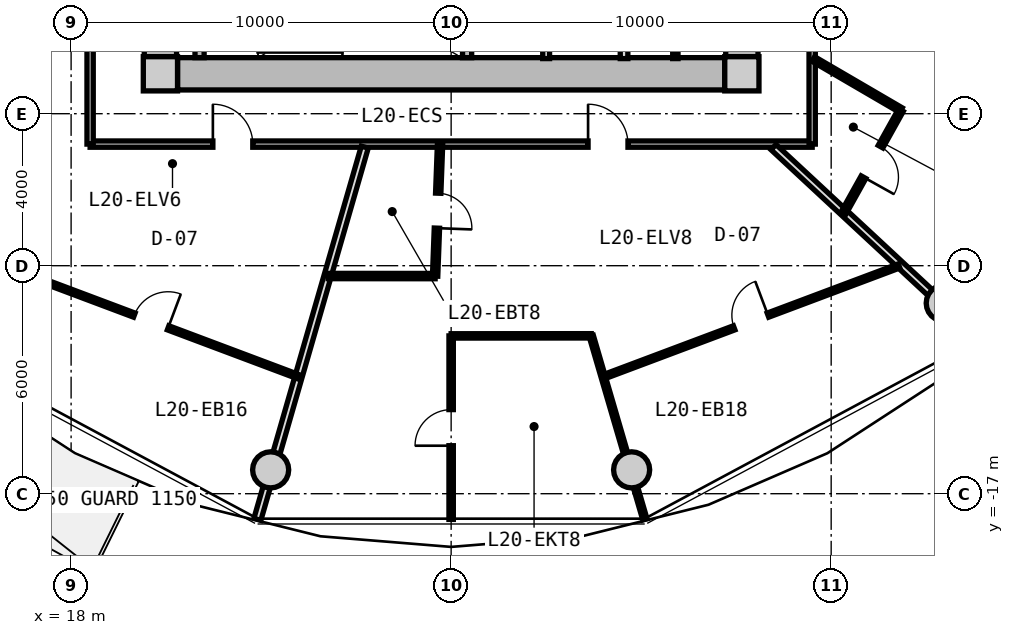
"""IFC4 building model, lengths in metres.
Left out: names, types, materials, properties, quantities, classifications, styles, units other than length and angle.
Written with IfcOpenShell. Run it as: python <this file> out.ifc"""

import sys

from ifc_helpers import new_model, si_unit, direction, frame, frame_2d, origin, origin_2d, place, context, subcontext, project, spatial, rectangle, circle, extrude, source, transform, mapped, element, fill, save


model = new_model("IFC4")
c1 = context("Model", 3, precision=1e-05, world=origin(), true_north=direction((0.0, 1.0)))
c2 = subcontext(c1, "Body", "Model", "MODEL_VIEW")
j1 = project(units=[si_unit("LENGTHUNIT", "METRE"), si_unit("PLANEANGLEUNIT", "RADIAN")], contexts=[c1])
p1 = place(None, origin())
s1 = spatial("IfcSite", under=j1, at=p1, CompositionType="ELEMENT")
p2 = place(p1, origin())
s2 = spatial("IfcBuilding", under=s1, at=p2, CompositionType="ELEMENT")
p3 = place(p2, frame((0.0, 0.0, 67.35)))
s3 = spatial("IfcBuildingStorey", under=s2, at=p3, CompositionType="ELEMENT", Elevation=67.35)
m1 = source(origin(), c2, "Body", "SweptSolid", [
    extrude(rectangle(XDim=0.9, YDim=0.9, at=origin_2d()), origin(), (0.0, 0.0, 1.0), 3.05),
])
for number, where, z_axis, x_axis in (
    (1, (20.35, -5.95, 0.0), (0.0, 0.0, 1.0), (1.0, 0.0, 0.0)),
    (2, (35.65, -5.95, 0.0), (0.0, 0.0, 1.0), (1.0, 0.0, 0.0)),
):
    element("IfcColumn", number, at=place(p3, frame(where, z_axis=z_axis, x_axis=x_axis)), inside=s3, PredefinedType="COLUMN", context=c2, shape_type="MappedRepresentation", body=[
        mapped(m1, transform((0.0, 0.0, 0.0), x_axis=(1.0, 0.0, 0.0), y_axis=(0.0, 1.0, 0.0), z_axis=(0.0, 0.0, 1.0), scale=1.0)),
    ])
m2 = source(origin(), c2, "Body", "SweptSolid", [
    extrude(rectangle(XDim=14.4, YDim=0.85, at=frame_2d((7.2, 0.0))), origin(), (0.0, 0.0, 1.0), 2.79),
])
p4 = place(p3, frame((35.2, -5.95, 0.0), z_axis=(0.0, 0.0, 1.0), x_axis=(-1.0, 0.0, 0.0)))
e3 = element("IfcWall", 3, at=p4, inside=s3, PredefinedType="SHEAR", context=c2, shape_type="MappedRepresentation", body=[
    mapped(m2, transform((0.0, 0.0, 0.0), x_axis=(1.0, 0.0, 0.0), y_axis=(0.0, 1.0, 0.0), z_axis=(0.0, 0.0, 1.0), scale=1.0)),
])
m3 = source(origin(), c2, "Body", "SweptSolid", [
    extrude(rectangle(XDim=11.0, YDim=0.85, at=frame_2d((5.5, 0.0))), origin(), (0.0, 0.0, 1.0), 2.79),
])
p5 = place(p3, frame((20.35, -5.5, 0.0), z_axis=(0.0, 0.0, 1.0), x_axis=(0.0, 1.0, 0.0)))
e4 = element("IfcWall", 4, at=p5, inside=s3, PredefinedType="SHEAR", context=c2, shape_type="MappedRepresentation", body=[
    mapped(m3, transform((0.0, 0.0, 0.0), x_axis=(1.0, 0.0, 0.0), y_axis=(0.0, 1.0, 0.0), z_axis=(0.0, 0.0, 1.0), scale=1.0)),
])
p6 = place(p5, frame((3.8, 0.0, 0.0)))
e5 = element("IfcOpeningElement", 5, at=p6, cuts=e4, PredefinedType="OPENING", context=c2, shape_type="SweptSolid", body=[
    extrude(rectangle(XDim=1.2, YDim=2.15, at=frame_2d((0.6, 1.075))), frame((0.0, 0.435, 0.0), z_axis=(0.0, -1.0, 0.0), x_axis=(1.0, 0.0, 0.0)), (0.0, 0.0, 1.0), 0.87),
])
p7 = place(p3, frame((35.65, 5.5, 0.0), z_axis=(0.0, 0.0, 1.0), x_axis=(0.0, -1.0, 0.0)))
e6 = element("IfcWall", 6, at=p7, inside=s3, PredefinedType="SHEAR", context=c2, shape_type="MappedRepresentation", body=[
    mapped(m3, transform((0.0, 0.0, 0.0), x_axis=(1.0, 0.0, 0.0), y_axis=(0.0, 1.0, 0.0), z_axis=(0.0, 0.0, 1.0), scale=1.0)),
])
p8 = place(p7, frame((5.65, 0.0, 0.0)))
e7 = element("IfcOpeningElement", 7, at=p8, cuts=e6, PredefinedType="OPENING", context=c2, shape_type="SweptSolid", body=[
    extrude(rectangle(XDim=1.2, YDim=2.15, at=frame_2d((0.6, 1.075))), frame((0.0, 0.435, 0.0), z_axis=(0.0, -1.0, 0.0), x_axis=(1.0, 0.0, 0.0)), (0.0, 0.0, 1.0), 0.87),
])
m4 = source(origin(), c2, "Body", "SweptSolid", [
    extrude(circle(Radius=0.475, at=origin_2d()), origin(), (0.0, 0.0, 1.0), 3.05),
])
for number, where, z_axis, x_axis in (
    (8, (23.251, -16.373, 0.0), (0.0, 0.0, 1.0), (1.0, 0.0, 0.0)),
    (9, (32.749, -16.373, 0.0), (0.0, 0.0, 1.0), (1.0, 0.0, 0.0)),
    (10, (40.975, -11.985, 0.0), (0.0, 0.0, 1.0), (1.0, 0.0, 0.0)),
):
    element("IfcColumn", number, at=place(p3, frame(where, z_axis=z_axis, x_axis=x_axis)), inside=s3, PredefinedType="COLUMN", context=c2, shape_type="MappedRepresentation", body=[
        mapped(m4, transform((0.0, 0.0, 0.0), x_axis=(1.0, 0.0, 0.0), y_axis=(0.0, 1.0, 0.0), z_axis=(0.0, 0.0, 1.0), scale=1.0)),
    ])
m5 = source(origin(), c2, "Body", "SweptSolid", [
    extrude(rectangle(XDim=3.075, YDim=0.24, at=frame_2d((1.538, 0.0))), origin(), (0.0, 0.0, 1.0), 2.79),
])
for number, where, z_axis, x_axis in (
    (11, (21.38, -5.525, 0.0), (0.0, 0.0, 1.0), (0.0, 1.0, 0.0)),
    (12, (28.42, -5.525, 0.0), (0.0, 0.0, 1.0), (0.0, 1.0, 0.0)),
):
    element("IfcWall", number, at=place(p3, frame(where, z_axis=z_axis, x_axis=x_axis)), inside=s3, PredefinedType="PARTITIONING", context=c2, shape_type="MappedRepresentation", body=[
        mapped(m5, transform((0.0, 0.0, 0.0), x_axis=(1.0, 0.0, 0.0), y_axis=(0.0, 1.0, 0.0), z_axis=(0.0, 0.0, 1.0), scale=1.0)),
    ])
m6 = source(origin(), c2, "Body", "SweptSolid", [
    extrude(rectangle(XDim=3.8, YDim=0.2, at=frame_2d((1.9, 0.0))), origin(), (0.0, 0.0, 1.0), 2.775),
])
p9 = place(p3, frame((32.55, -5.55, 0.0), z_axis=(0.0, 0.0, 1.0), x_axis=(0.0, 1.0, 0.0)))
e13 = element("IfcWall", 13, at=p9, inside=s3, PredefinedType="PARTITIONING", context=c2, shape_type="MappedRepresentation", body=[
    mapped(m6, transform((0.0, 0.0, 0.0), x_axis=(1.0, 0.0, 0.0), y_axis=(0.0, 1.0, 0.0), z_axis=(0.0, 0.0, 1.0), scale=1.0)),
])
m7 = source(origin(), c2, "Body", "SweptSolid", [
    extrude(rectangle(XDim=3.22, YDim=0.18, at=frame_2d((1.61, 0.0))), origin(), (0.0, 0.0, 1.0), 2.775),
])
p10 = place(p3, frame((30.5, -5.55, 0.0), z_axis=(0.0, 0.0, 1.0), x_axis=(0.0, 1.0, 0.0)))
e14 = element("IfcWall", 14, at=p10, inside=s3, PredefinedType="PARTITIONING", context=c2, shape_type="MappedRepresentation", body=[
    mapped(m7, transform((0.0, 0.0, 0.0), x_axis=(1.0, 0.0, 0.0), y_axis=(0.0, 1.0, 0.0), z_axis=(0.0, 0.0, 1.0), scale=1.0)),
])
m8 = source(origin(), c2, "Body", "SweptSolid", [
    extrude(rectangle(XDim=3.8, YDim=0.14, at=frame_2d((1.9, 0.0))), origin(), (0.0, 0.0, 1.0), 2.775),
])
p11 = place(p3, frame((33.9, -5.55, 0.0), z_axis=(0.0, 0.0, 1.0), x_axis=(0.0, 1.0, 0.0)))
e15 = element("IfcWall", 15, at=p11, inside=s3, PredefinedType="PARTITIONING", context=c2, shape_type="MappedRepresentation", body=[
    mapped(m8, transform((0.0, 0.0, 0.0), x_axis=(1.0, 0.0, 0.0), y_axis=(0.0, 1.0, 0.0), z_axis=(0.0, 0.0, 1.0), scale=1.0)),
])
m9 = source(origin(), c2, "Body", "SweptSolid", [
    extrude(rectangle(XDim=19.0, YDim=0.165, at=frame_2d((9.5, 0.0))), origin(), (0.0, 0.0, 1.0), 2.775),
])
p12 = place(p3, frame((37.5, -7.8, 0.0), z_axis=(0.0, 0.0, 1.0), x_axis=(-1.0, 0.0, 0.0)))
e16 = element("IfcWall", 16, at=p12, inside=s3, PredefinedType="PARTITIONING", context=c2, shape_type="MappedRepresentation", body=[
    mapped(m9, transform((0.0, 0.0, 0.0), x_axis=(1.0, 0.0, 0.0), y_axis=(0.0, 1.0, 0.0), z_axis=(0.0, 0.0, 1.0), scale=1.0)),
])
p13 = place(p12, frame((14.72, 0.0, 0.0)))
e17 = element("IfcOpeningElement", 17, at=p13, cuts=e16, PredefinedType="OPENING", context=c2, shape_type="SweptSolid", body=[
    extrude(rectangle(XDim=1.05, YDim=2.15, at=frame_2d((0.525, 1.075))), frame((0.0, 0.093, 0.0), z_axis=(0.0, -1.0, 0.0), x_axis=(1.0, 0.0, 0.0)), (0.0, 0.0, 1.0), 0.185),
])
p14 = place(p12, frame((4.847, 0.0, 0.0)))
e18 = element("IfcOpeningElement", 18, at=p14, cuts=e16, PredefinedType="OPENING", context=c2, shape_type="SweptSolid", body=[
    extrude(rectangle(XDim=1.05, YDim=2.15, at=frame_2d((0.525, 1.075))), frame((0.0, 0.093, 0.0), z_axis=(0.0, -1.0, 0.0), x_axis=(1.0, 0.0, 0.0)), (0.0, 0.0, 1.0), 0.185),
])
m10 = source(origin(), c2, "Body", "SweptSolid", [
    extrude(rectangle(XDim=15.6, YDim=0.165, at=frame_2d((7.8, 0.0))), origin(), (0.0, 0.0, 1.0), 2.775),
])
p15 = place(p3, frame((18.5, -7.8, 0.0), z_axis=(0.0, 0.0, 1.0), x_axis=(0.0, 1.0, 0.0)))
e19 = element("IfcWall", 19, at=p15, inside=s3, PredefinedType="PARTITIONING", context=c2, shape_type="MappedRepresentation", body=[
    mapped(m10, transform((0.0, 0.0, 0.0), x_axis=(1.0, 0.0, 0.0), y_axis=(0.0, 1.0, 0.0), z_axis=(0.0, 0.0, 1.0), scale=1.0)),
])
p16 = place(p15, frame((14.215, 0.0, 0.0)))
e20 = element("IfcOpeningElement", 20, at=p16, cuts=e19, PredefinedType="OPENING", context=c2, shape_type="SweptSolid", body=[
    extrude(rectangle(XDim=0.92, YDim=2.1, at=frame_2d((0.46, 1.05))), frame((0.0, 0.093, 0.0), z_axis=(0.0, -1.0, 0.0), x_axis=(1.0, 0.0, 0.0)), (0.0, 0.0, 1.0), 0.185),
])
p17 = place(p15, frame((11.609, 0.0, 0.0)))
e21 = element("IfcOpeningElement", 21, at=p17, cuts=e19, PredefinedType="OPENING", context=c2, shape_type="SweptSolid", body=[
    extrude(rectangle(XDim=0.92, YDim=2.1, at=frame_2d((0.46, 1.05))), frame((0.0, 0.093, 0.0), z_axis=(0.0, -1.0, 0.0), x_axis=(1.0, 0.0, 0.0)), (0.0, 0.0, 1.0), 0.185),
])
p18 = place(p15, frame((7.175, 0.0, 0.0)))
e22 = element("IfcOpeningElement", 22, at=p18, cuts=e19, PredefinedType="OPENING", context=c2, shape_type="SweptSolid", body=[
    extrude(rectangle(XDim=1.25, YDim=2.2, at=frame_2d((0.625, 1.1))), frame((0.0, 0.093, 0.0), z_axis=(0.0, -1.0, 0.0), x_axis=(1.0, 0.0, 0.0)), (0.0, 0.0, 1.0), 0.185),
])
p19 = place(p3, frame((37.5, 7.8, 0.0), z_axis=(0.0, 0.0, 1.0), x_axis=(0.0, -1.0, 0.0)))
e23 = element("IfcWall", 23, at=p19, inside=s3, PredefinedType="PARTITIONING", context=c2, shape_type="MappedRepresentation", body=[
    mapped(m10, transform((0.0, 0.0, 0.0), x_axis=(1.0, 0.0, 0.0), y_axis=(0.0, 1.0, 0.0), z_axis=(0.0, 0.0, 1.0), scale=1.0)),
])
p20 = place(p19, frame((8.835, 0.0, 0.0)))
e24 = element("IfcOpeningElement", 24, at=p20, cuts=e23, PredefinedType="OPENING", context=c2, shape_type="SweptSolid", body=[
    extrude(rectangle(XDim=1.05, YDim=2.15, at=frame_2d((0.525, 1.075))), frame((0.0, 0.093, 0.0), z_axis=(0.0, -1.0, 0.0), x_axis=(1.0, 0.0, 0.0)), (0.0, 0.0, 1.0), 0.185),
])
m11 = source(origin(), c2, "Body", "SweptSolid", [
    extrude(rectangle(XDim=10.196, YDim=0.19, at=frame_2d((5.098, 0.0))), origin(), (0.0, 0.0, 1.0), 2.225),
])
p21 = place(p3, frame((25.727, -7.88, 0.0), z_axis=(0.0, 0.0, 1.0), x_axis=(-0.277136420347, -0.960830580549, 0.0)))
e25 = element("IfcWall", 25, at=p21, inside=s3, PredefinedType="PARTITIONING", context=c2, shape_type="MappedRepresentation", body=[
    mapped(m11, transform((0.0, 0.0, 0.0), x_axis=(1.0, 0.0, 0.0), y_axis=(0.0, 1.0, 0.0), z_axis=(0.0, 0.0, 1.0), scale=1.0)),
])
m12 = source(origin(), c2, "Body", "SweptSolid", [
    extrude(rectangle(XDim=8.32, YDim=0.115, at=frame_2d((4.16, 0.0))), origin(), (0.0, 0.0, 1.0), 2.775),
])
p22 = place(p3, frame((16.214, -11.006, 0.0), z_axis=(0.0, 0.0, 1.0), x_axis=(0.936180763098, -0.351518959382, 0.0)))
e26 = element("IfcWall", 26, at=p22, inside=s3, PredefinedType="PARTITIONING", context=c2, shape_type="MappedRepresentation", body=[
    mapped(m12, transform((0.0, 0.0, 0.0), x_axis=(1.0, 0.0, 0.0), y_axis=(0.0, 1.0, 0.0), z_axis=(0.0, 0.0, 1.0), scale=1.0)),
])
p23 = place(p22, frame((3.685, 0.0, 0.0)))
e27 = element("IfcOpeningElement", 27, at=p23, cuts=e26, PredefinedType="OPENING", context=c2, shape_type="SweptSolid", body=[
    extrude(rectangle(XDim=0.95, YDim=2.1, at=frame_2d((0.475, 1.05))), frame((0.0, 0.067, 0.0), z_axis=(0.0, -1.0, 0.0), x_axis=(1.0, 0.0, 0.0)), (0.0, 0.0, 1.0), 0.135),
])
m13 = source(origin(), c2, "Body", "SweptSolid", [
    extrude(rectangle(XDim=2.834, YDim=0.14, at=frame_2d((1.417, 0.0))), origin(), (0.0, 0.0, 1.0), 2.775),
])
p24 = place(p3, frame((18.47, -4.732, 0.0), z_axis=(0.0, 0.0, 1.0), x_axis=(-0.895681174462, -0.444696788513, 0.0)))
e28 = element("IfcWall", 28, at=p24, inside=s3, PredefinedType="PARTITIONING", context=c2, shape_type="MappedRepresentation", body=[
    mapped(m13, transform((0.0, 0.0, 0.0), x_axis=(1.0, 0.0, 0.0), y_axis=(0.0, 1.0, 0.0), z_axis=(0.0, 0.0, 1.0), scale=1.0)),
])
m14 = source(origin(), c2, "Body", "SweptSolid", [
    extrude(rectangle(XDim=7.435, YDim=0.19, at=frame_2d((3.717, 0.0))), origin(), (0.0, 0.0, 1.0), 2.225),
])
p25 = place(p3, frame((36.483, -7.88, 0.0), z_axis=(0.0, 0.0, 1.0), x_axis=(0.732651956848, -0.680603489652, 0.0)))
e29 = element("IfcWall", 29, at=p25, inside=s3, PredefinedType="PARTITIONING", context=c2, shape_type="MappedRepresentation", body=[
    mapped(m14, transform((0.0, 0.0, 0.0), x_axis=(1.0, 0.0, 0.0), y_axis=(0.0, 1.0, 0.0), z_axis=(0.0, 0.0, 1.0), scale=1.0)),
])
p26 = place(p3, frame((31.997, -13.93, 0.0), z_axis=(0.0, 0.0, 1.0), x_axis=(0.936180763098, 0.351518959382, 0.0)))
e30 = element("IfcWall", 30, at=p26, inside=s3, PredefinedType="PARTITIONING", context=c2, shape_type="MappedRepresentation", body=[
    mapped(m12, transform((0.0, 0.0, 0.0), x_axis=(1.0, 0.0, 0.0), y_axis=(0.0, 1.0, 0.0), z_axis=(0.0, 0.0, 1.0), scale=1.0)),
])
p27 = place(p26, frame((3.685, 0.0, 0.0)))
e31 = element("IfcOpeningElement", 31, at=p27, cuts=e30, PredefinedType="OPENING", context=c2, shape_type="SweptSolid", body=[
    extrude(rectangle(XDim=0.95, YDim=2.1, at=frame_2d((0.475, 1.05))), frame((0.0, 0.067, 0.0), z_axis=(0.0, -1.0, 0.0), x_axis=(1.0, 0.0, 0.0)), (0.0, 0.0, 1.0), 0.135),
])
m15 = source(origin(), c2, "Body", "SweptSolid", [
    extrude(rectangle(XDim=5.031, YDim=0.115, at=frame_2d((2.515, 0.0))), origin(), (0.0, 0.0, 1.0), 2.225),
])
p28 = place(p3, frame((31.687, -12.848, 0.0), z_axis=(0.0, 0.0, 1.0), x_axis=(0.280657788738, -0.959807900374, 0.0)))
e32 = element("IfcWall", 32, at=p28, inside=s3, PredefinedType="PARTITIONING", context=c2, shape_type="MappedRepresentation", body=[
    mapped(m15, transform((0.0, 0.0, 0.0), x_axis=(1.0, 0.0, 0.0), y_axis=(0.0, 1.0, 0.0), z_axis=(0.0, 0.0, 1.0), scale=1.0)),
])
m16 = source(origin(), c2, "Body", "SweptSolid", [
    extrude(rectangle(XDim=3.446, YDim=0.14, at=frame_2d((1.723, 0.0))), origin(), (0.0, 0.0, 1.0), 2.775),
])
p29 = place(p3, frame((27.707, -7.83, 0.0), z_axis=(0.0, 0.0, 1.0), x_axis=(-0.037409983043, -0.999300001585, 0.0)))
e33 = element("IfcWall", 33, at=p29, inside=s3, PredefinedType="PARTITIONING", context=c2, shape_type="MappedRepresentation", body=[
    mapped(m16, transform((0.0, 0.0, 0.0), x_axis=(1.0, 0.0, 0.0), y_axis=(0.0, 1.0, 0.0), z_axis=(0.0, 0.0, 1.0), scale=1.0)),
])
p30 = place(p29, frame((1.263, 0.0, 0.0)))
e34 = element("IfcOpeningElement", 34, at=p30, cuts=e33, PredefinedType="OPENING", context=c2, shape_type="SweptSolid", body=[
    extrude(rectangle(XDim=0.92, YDim=2.1, at=frame_2d((0.46, 1.05))), frame((0.0, 0.08, 0.0), z_axis=(0.0, -1.0, 0.0), x_axis=(1.0, 0.0, 0.0)), (0.0, 0.0, 1.0), 0.16),
])
m17 = source(origin(), c2, "Body", "SweptSolid", [
    extrude(rectangle(XDim=2.813, YDim=0.14, at=frame_2d((1.406, 0.0))), origin(), (0.0, 0.0, 1.0), 2.775),
])
p31 = place(p3, frame((27.578, -11.273, 0.0), z_axis=(0.0, 0.0, 1.0), x_axis=(-0.99999981542, 0.000607586035, 0.0)))
e35 = element("IfcWall", 35, at=p31, inside=s3, PredefinedType="PARTITIONING", context=c2, shape_type="MappedRepresentation", body=[
    mapped(m17, transform((0.0, 0.0, 0.0), x_axis=(1.0, 0.0, 0.0), y_axis=(0.0, 1.0, 0.0), z_axis=(0.0, 0.0, 1.0), scale=1.0)),
])
m18 = source(origin(), c2, "Body", "SweptSolid", [
    extrude(rectangle(XDim=4.829, YDim=0.115, at=frame_2d((2.415, 0.0))), origin(), (0.0, 0.0, 1.0), 2.775),
])
p32 = place(p3, frame((28.0, -12.848, 0.0), z_axis=(0.0, 0.0, 1.0), x_axis=(0.0, -1.0, 0.0)))
e36 = element("IfcWall", 36, at=p32, inside=s3, PredefinedType="PARTITIONING", context=c2, shape_type="MappedRepresentation", body=[
    mapped(m18, transform((0.0, 0.0, 0.0), x_axis=(1.0, 0.0, 0.0), y_axis=(0.0, 1.0, 0.0), z_axis=(0.0, 0.0, 1.0), scale=1.0)),
])
p33 = place(p32, frame((1.939, 0.0, 0.0)))
e37 = element("IfcOpeningElement", 37, at=p33, cuts=e36, PredefinedType="OPENING", context=c2, shape_type="SweptSolid", body=[
    extrude(rectangle(XDim=0.95, YDim=2.1, at=frame_2d((0.475, 1.05))), frame((0.0, 0.067, 0.0), z_axis=(0.0, -1.0, 0.0), x_axis=(1.0, 0.0, 0.0)), (0.0, 0.0, 1.0), 0.135),
])
m19 = source(origin(), c2, "Body", "SweptSolid", [
    extrude(rectangle(XDim=3.686, YDim=0.115, at=frame_2d((1.843, 0.0))), origin(), (0.0, 0.0, 1.0), 2.775),
])
p34 = place(p3, frame((28.0, -12.848, 0.0), z_axis=(0.0, 0.0, 1.0), x_axis=(0.999999780653, 0.000662339237, 0.0)))
e38 = element("IfcWall", 38, at=p34, inside=s3, PredefinedType="PARTITIONING", context=c2, shape_type="MappedRepresentation", body=[
    mapped(m19, transform((0.0, 0.0, 0.0), x_axis=(1.0, 0.0, 0.0), y_axis=(0.0, 1.0, 0.0), z_axis=(0.0, 0.0, 1.0), scale=1.0)),
])
m20 = source(origin(), c2, "Body", "SweptSolid", [
    extrude(rectangle(XDim=2.669, YDim=0.14, at=frame_2d((1.335, 0.0))), origin(), (0.0, 0.0, 1.0), 2.775),
])
p35 = place(p3, frame((37.53, -5.561, 0.0), z_axis=(0.0, 0.0, 1.0), x_axis=(0.86369928178, -0.50400749067, 0.0)))
e39 = element("IfcWall", 39, at=p35, inside=s3, PredefinedType="PARTITIONING", context=c2, shape_type="MappedRepresentation", body=[
    mapped(m20, transform((0.0, 0.0, 0.0), x_axis=(1.0, 0.0, 0.0), y_axis=(0.0, 1.0, 0.0), z_axis=(0.0, 0.0, 1.0), scale=1.0)),
])
m21 = source(origin(), c2, "Body", "SweptSolid", [
    extrude(rectangle(XDim=3.121, YDim=0.14, at=frame_2d((1.561, 0.0))), origin(), (0.0, 0.0, 1.0), 2.775),
])
p36 = place(p3, frame((39.836, -6.906, 0.0), z_axis=(0.0, 0.0, 1.0), x_axis=(-0.487302357327, -0.873233309342, 0.0)))
e40 = element("IfcWall", 40, at=p36, inside=s3, PredefinedType="PARTITIONING", context=c2, shape_type="MappedRepresentation", body=[
    mapped(m21, transform((0.0, 0.0, 0.0), x_axis=(1.0, 0.0, 0.0), y_axis=(0.0, 1.0, 0.0), z_axis=(0.0, 0.0, 1.0), scale=1.0)),
])
p37 = place(p36, frame((1.101, 0.0, 0.0)))
e41 = element("IfcOpeningElement", 41, at=p37, cuts=e40, PredefinedType="OPENING", context=c2, shape_type="SweptSolid", body=[
    extrude(rectangle(XDim=0.92, YDim=2.1, at=frame_2d((0.46, 1.05))), frame((0.0, 0.08, 0.0), z_axis=(0.0, -1.0, 0.0), x_axis=(1.0, 0.0, 0.0)), (0.0, 0.0, 1.0), 0.16),
])
m22 = source(origin(), c2, "Body", "SweptSolid", [
    extrude(rectangle(XDim=1.05, YDim=2.15, at=frame_2d((0.525, 1.075))), frame((0.0, 0.025, 0.0), z_axis=(0.0, -1.0, 0.0), x_axis=(1.0, 0.0, 0.0)), (0.0, 0.0, 1.0), 0.05),
])
p38 = place(p13, frame((1.05, 0.0, 0.0), z_axis=(0.0, 0.0, 1.0), x_axis=(-1.0, 0.0, 0.0)))
e42 = element("IfcDoor", 42, at=p38, inside=s3, OperationType="SINGLE_SWING_LEFT", PredefinedType="DOOR", context=c2, shape_type="MappedRepresentation", body=[
    mapped(m22, transform((0.0, 0.0, 0.0), x_axis=(1.0, 0.0, 0.0), y_axis=(0.0, 1.0, 0.0), z_axis=(0.0, 0.0, 1.0), scale=1.0)),
])
fill(e17, e42)
m23 = source(origin(), c2, "Body", "SweptSolid", [
    extrude(rectangle(XDim=0.95, YDim=2.1, at=frame_2d((0.475, 1.05))), frame((0.0, 0.025, 0.0), z_axis=(0.0, -1.0, 0.0), x_axis=(1.0, 0.0, 0.0)), (0.0, 0.0, 1.0), 0.05),
])
p39 = place(p23, origin())
e43 = element("IfcDoor", 43, at=p39, inside=s3, OperationType="SINGLE_SWING_RIGHT", PredefinedType="DOOR", context=c2, shape_type="MappedRepresentation", body=[
    mapped(m23, transform((0.0, 0.0, 0.0), x_axis=(1.0, 0.0, 0.0), y_axis=(0.0, 1.0, 0.0), z_axis=(0.0, 0.0, 1.0), scale=1.0)),
])
fill(e27, e43)
p40 = place(p14, frame((1.05, 0.0, 0.0), z_axis=(0.0, 0.0, 1.0), x_axis=(-1.0, 0.0, 0.0)))
e44 = element("IfcDoor", 44, at=p40, inside=s3, OperationType="SINGLE_SWING_LEFT", PredefinedType="DOOR", context=c2, shape_type="MappedRepresentation", body=[
    mapped(m22, transform((0.0, 0.0, 0.0), x_axis=(1.0, 0.0, 0.0), y_axis=(0.0, 1.0, 0.0), z_axis=(0.0, 0.0, 1.0), scale=1.0)),
])
fill(e18, e44)
m24 = source(origin(), c2, "Body", "SweptSolid", [
    extrude(rectangle(XDim=0.92, YDim=2.1, at=frame_2d((0.46, 1.05))), frame((0.0, 0.025, 0.0), z_axis=(0.0, -1.0, 0.0), x_axis=(1.0, 0.0, 0.0)), (0.0, 0.0, 1.0), 0.05),
])
p41 = place(p30, origin())
e45 = element("IfcDoor", 45, at=p41, inside=s3, OperationType="SINGLE_SWING_RIGHT", PredefinedType="DOOR", context=c2, shape_type="MappedRepresentation", body=[
    mapped(m24, transform((0.0, 0.0, 0.0), x_axis=(1.0, 0.0, 0.0), y_axis=(0.0, 1.0, 0.0), z_axis=(0.0, 0.0, 1.0), scale=1.0)),
])
fill(e34, e45)
p42 = place(p33, frame((0.95, 0.0, 0.0), z_axis=(0.0, 0.0, 1.0), x_axis=(-1.0, 0.0, 0.0)))
e46 = element("IfcDoor", 46, at=p42, inside=s3, OperationType="SINGLE_SWING_LEFT", PredefinedType="DOOR", context=c2, shape_type="MappedRepresentation", body=[
    mapped(m23, transform((0.0, 0.0, 0.0), x_axis=(1.0, 0.0, 0.0), y_axis=(0.0, 1.0, 0.0), z_axis=(0.0, 0.0, 1.0), scale=1.0)),
])
fill(e37, e46)
p43 = place(p27, origin())
e47 = element("IfcDoor", 47, at=p43, inside=s3, OperationType="SINGLE_SWING_RIGHT", PredefinedType="DOOR", context=c2, shape_type="MappedRepresentation", body=[
    mapped(m23, transform((0.0, 0.0, 0.0), x_axis=(1.0, 0.0, 0.0), y_axis=(0.0, 1.0, 0.0), z_axis=(0.0, 0.0, 1.0), scale=1.0)),
])
fill(e31, e47)
p44 = place(p37, origin())
e48 = element("IfcDoor", 48, at=p44, inside=s3, OperationType="SINGLE_SWING_RIGHT", PredefinedType="DOOR", context=c2, shape_type="MappedRepresentation", body=[
    mapped(m24, transform((0.0, 0.0, 0.0), x_axis=(1.0, 0.0, 0.0), y_axis=(0.0, 1.0, 0.0), z_axis=(0.0, 0.0, 1.0), scale=1.0)),
])
fill(e41, e48)
save(model, sys.argv[1])
